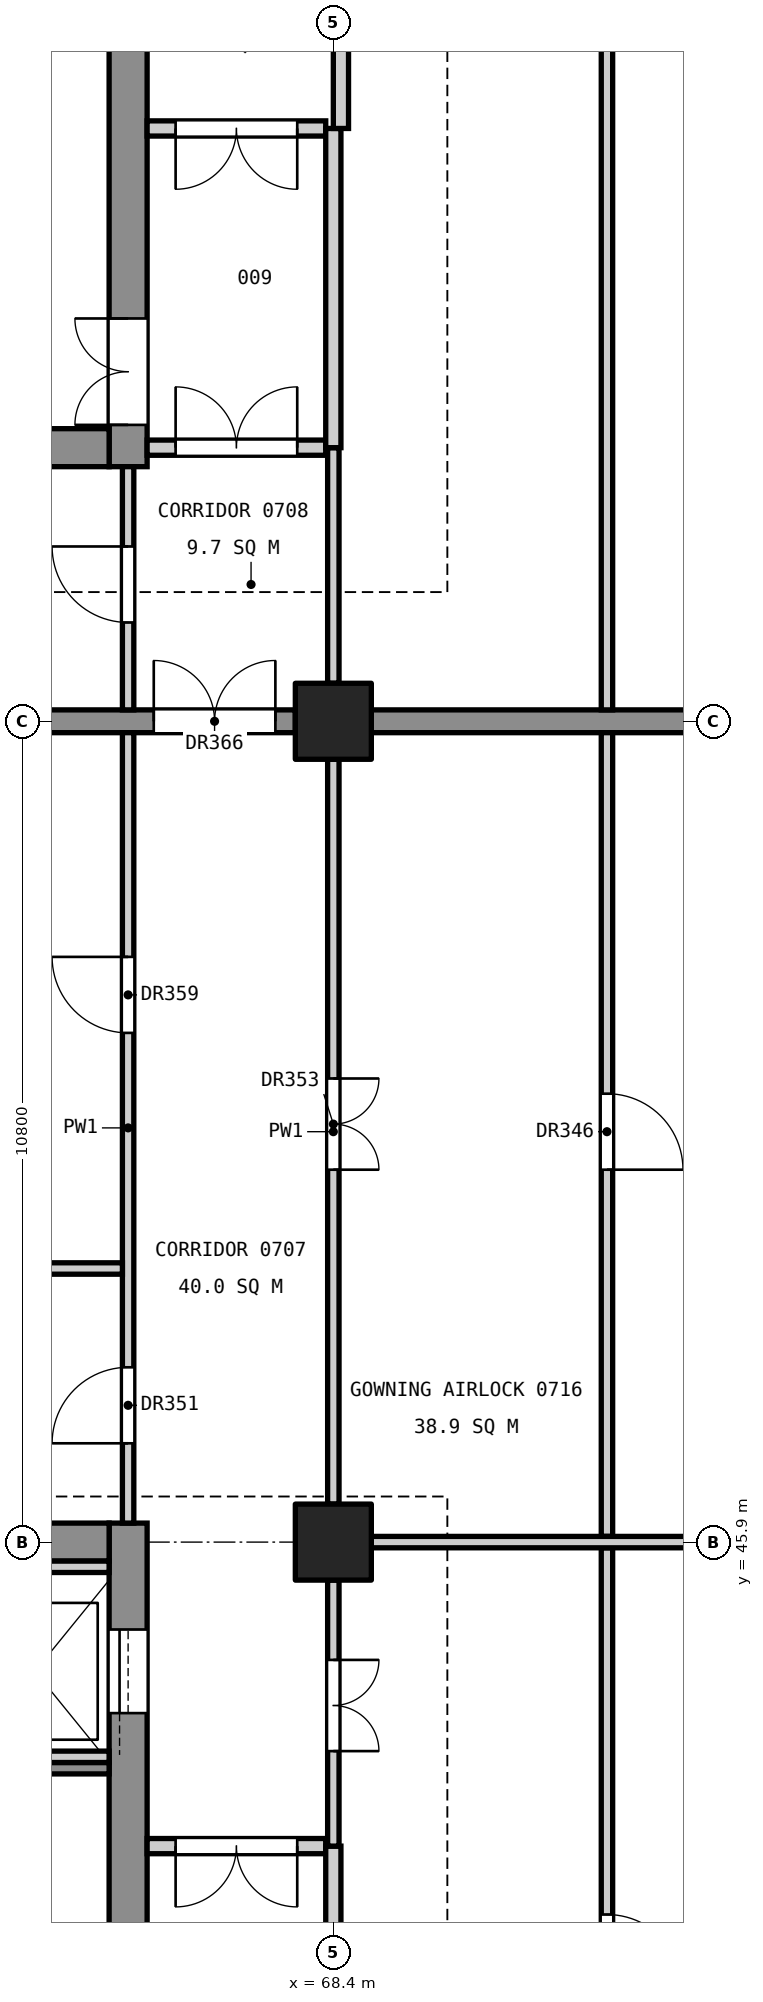
"""IFC4 building model, lengths in metres.
Left out: names, types, materials, properties, quantities, classifications, styles, units other than length and angle.
Written with IfcOpenShell. Run it as: python <this file> out.ifc"""

import sys

from ifc_helpers import new_model, si_unit, direction, frame, frame_2d, origin, origin_2d, place, context, subcontext, project, spatial, rectangle, extrude, element, fill, save


model = new_model("IFC4")
c1 = context("Model", 3, precision=1e-05, world=origin(), true_north=direction((0.0, 1.0)))
c2 = subcontext(c1, "Body", "Model", "MODEL_VIEW")
j1 = project(units=[si_unit("LENGTHUNIT", "METRE"), si_unit("PLANEANGLEUNIT", "RADIAN")], contexts=[c1])
p1 = place(None, origin())
s1 = spatial("IfcSite", under=j1, at=p1, CompositionType="ELEMENT")
p2 = place(p1, origin())
s2 = spatial("IfcBuilding", under=s1, at=p2, CompositionType="ELEMENT")
p3 = place(p2, frame((0.0, 0.0, 36.6)))
s3 = spatial("IfcBuildingStorey", under=s2, at=p3, CompositionType="ELEMENT", Elevation=36.6)
for number, where, z_axis, x_axis in (
    (1, (68.4, 45.9, 0.0), (0.0, 0.0, 1.0), (1.0, 0.0, 0.0)),
    (2, (68.4, 56.7, 0.0), (0.0, 0.0, 1.0), (1.0, 0.0, 0.0)),
):
    element("IfcColumn", number, at=place(p3, frame(where, z_axis=z_axis, x_axis=x_axis)), inside=s3, PredefinedType="COLUMN", context=c2, shape_type="SweptSolid", body=[
        extrude(rectangle(XDim=1.0, YDim=1.0, at=origin_2d()), origin(), (0.0, 0.0, 1.0), 4.8),
    ])
p4 = place(p3, frame((65.7, 34.85, 0.0), z_axis=(0.0, 0.0, 1.0), x_axis=(0.0, 1.0, 0.0)))
e3 = element("IfcWall", 3, at=p4, inside=s3, PredefinedType="SHEAR", context=c2, shape_type="SweptSolid", body=[
    extrude(rectangle(XDim=11.3, YDim=0.5, at=frame_2d((5.65, 0.0))), origin(), (0.0, 0.0, 1.0), 4.55),
])
p5 = place(p4, frame((0.55, 0.0, 0.0)))
e4 = element("IfcOpeningElement", 4, at=p5, cuts=e3, PredefinedType="OPENING", context=c2, shape_type="SweptSolid", body=[
    extrude(rectangle(XDim=1.4, YDim=2.1, at=frame_2d((0.7, 1.05))), frame((0.0, 0.26, 0.0), z_axis=(0.0, -1.0, 0.0), x_axis=(1.0, 0.0, 0.0)), (0.0, 0.0, 1.0), 0.52),
])
p6 = place(p4, frame((8.8, 0.0, 0.0)))
e5 = element("IfcOpeningElement", 5, at=p6, cuts=e3, PredefinedType="OPENING", context=c2, shape_type="SweptSolid", body=[
    extrude(rectangle(XDim=1.1, YDim=2.1, at=frame_2d((0.55, 1.05))), frame((0.0, 0.26, 0.0), z_axis=(0.0, -1.0, 0.0), x_axis=(1.0, 0.0, 0.0)), (0.0, 0.0, 1.0), 0.52),
])
p7 = place(p3, frame((61.45, 45.9, 0.0), z_axis=(0.0, 0.0, 1.0), x_axis=(1.0, 0.0, 0.0)))
e6 = element("IfcWall", 6, at=p7, inside=s3, PredefinedType="SHEAR", context=c2, shape_type="SweptSolid", body=[
    extrude(rectangle(XDim=4.0, YDim=0.5, at=frame_2d((2.0, 0.0))), origin(), (0.0, 0.0, 1.0), 4.55),
])
p8 = place(p3, frame((65.7, 60.05, 0.0), z_axis=(0.0, 0.0, 1.0), x_axis=(0.0, 1.0, 0.0)))
e7 = element("IfcWall", 7, at=p8, inside=s3, PredefinedType="SHEAR", context=c2, shape_type="SweptSolid", body=[
    extrude(rectangle(XDim=14.9, YDim=0.5, at=frame_2d((7.45, 0.0))), origin(), (0.0, 0.0, 1.0), 4.55),
])
p9 = place(p8, frame((0.55, 0.0, 0.0)))
e8 = element("IfcOpeningElement", 8, at=p9, cuts=e7, PredefinedType="OPENING", context=c2, shape_type="SweptSolid", body=[
    extrude(rectangle(XDim=1.4, YDim=2.1, at=frame_2d((0.7, 1.05))), frame((0.0, 0.26, 0.0), z_axis=(0.0, -1.0, 0.0), x_axis=(1.0, 0.0, 0.0)), (0.0, 0.0, 1.0), 0.52),
])
p10 = place(p8, frame((8.85, 0.0, 0.0)))
e9 = element("IfcOpeningElement", 9, at=p10, cuts=e7, PredefinedType="OPENING", context=c2, shape_type="SweptSolid", body=[
    extrude(rectangle(XDim=1.1, YDim=2.1, at=frame_2d((0.55, 1.05))), frame((0.0, 0.26, 0.0), z_axis=(0.0, -1.0, 0.0), x_axis=(1.0, 0.0, 0.0)), (0.0, 0.0, 1.0), 0.52),
])
p11 = place(p8, frame((11.4, 0.0, 0.0)))
e10 = element("IfcOpeningElement", 10, at=p11, cuts=e7, PredefinedType="OPENING", context=c2, shape_type="SweptSolid", body=[
    extrude(rectangle(XDim=1.1, YDim=2.1, at=frame_2d((0.55, 1.05))), frame((0.0, 0.26, 0.0), z_axis=(0.0, -1.0, 0.0), x_axis=(1.0, 0.0, 0.0)), (0.0, 0.0, 1.0), 0.52),
])
p12 = place(p3, frame((61.45, 60.3, 0.0), z_axis=(0.0, 0.0, 1.0), x_axis=(1.0, 0.0, 0.0)))
e11 = element("IfcWall", 11, at=p12, inside=s3, PredefinedType="SHEAR", context=c2, shape_type="SweptSolid", body=[
    extrude(rectangle(XDim=4.0, YDim=0.5, at=frame_2d((2.0, 0.0))), origin(), (0.0, 0.0, 1.0), 4.55),
])
p13 = place(p3, frame((61.7, 56.7, 0.0), z_axis=(0.0, 0.0, 1.0), x_axis=(1.0, 0.0, 0.0)))
e12 = element("IfcWall", 12, at=p13, inside=s3, PredefinedType="SHEAR", context=c2, shape_type="SweptSolid", body=[
    extrude(rectangle(XDim=6.2, YDim=0.3, at=frame_2d((3.1, 0.0))), origin(), (0.0, 0.0, 1.0), 4.55),
])
p14 = place(p13, frame((4.337, 0.0, 0.0)))
e13 = element("IfcOpeningElement", 13, at=p14, cuts=e12, PredefinedType="OPENING", context=c2, shape_type="SweptSolid", body=[
    extrude(rectangle(XDim=1.6, YDim=2.1, at=frame_2d((0.8, 1.05))), frame((0.0, 0.16, 0.0), z_axis=(0.0, -1.0, 0.0), x_axis=(1.0, 0.0, 0.0)), (0.0, 0.0, 1.0), 0.32),
])
p15 = place(p3, frame((68.9, 56.7, 0.0), z_axis=(0.0, 0.0, 1.0), x_axis=(1.0, 0.0, 0.0)))
e14 = element("IfcWall", 14, at=p15, inside=s3, PredefinedType="SHEAR", context=c2, shape_type="SweptSolid", body=[
    extrude(rectangle(XDim=9.8, YDim=0.3, at=frame_2d((4.9, 0.0))), origin(), (0.0, 0.0, 1.0), 4.55),
])
p16 = place(p3, frame((61.45, 42.925, 0.0), z_axis=(0.0, 0.0, 1.0), x_axis=(1.0, 0.0, 0.0)))
e15 = element("IfcWall", 15, at=p16, inside=s3, PredefinedType="SOLIDWALL", context=c2, shape_type="SweptSolid", body=[
    extrude(rectangle(XDim=4.0, YDim=0.15, at=frame_2d((2.0, 0.0))), origin(), (0.0, 0.0, 1.0), 4.55),
])
for number, where, z_axis, x_axis in (
    (16, (63.65, 43.075, 0.0), (0.0, 0.0, 1.0), (1.0, 0.0, 0.0)),
    (17, (63.65, 45.575, 0.0), (0.0, 0.0, 1.0), (1.0, 0.0, 0.0)),
):
    element("IfcWall", number, at=place(p3, frame(where, z_axis=z_axis, x_axis=x_axis)), inside=s3, PredefinedType="SOLIDWALL", context=c2, shape_type="SweptSolid", body=[
        extrude(rectangle(XDim=1.8, YDim=0.15, at=frame_2d((0.9, 0.0))), origin(), (0.0, 0.0, 1.0), 4.8),
    ])
p17 = place(p3, frame((65.7, 46.15, 0.0), z_axis=(0.0, 0.0, 1.0), x_axis=(0.0, 1.0, 0.0)))
e18 = element("IfcWall", 18, at=p17, inside=s3, PredefinedType="PARTITIONING", context=c2, shape_type="SweptSolid", body=[
    extrude(rectangle(XDim=10.4, YDim=0.15, at=frame_2d((5.2, 0.0))), origin(), (0.0, 0.0, 1.0), 3.55),
])
p18 = place(p17, frame((1.05, 0.0, 0.0)))
e19 = element("IfcOpeningElement", 19, at=p18, cuts=e18, PredefinedType="OPENING", context=c2, shape_type="SweptSolid", body=[
    extrude(rectangle(XDim=1.0, YDim=2.1, at=frame_2d((0.5, 1.05))), frame((0.0, 0.085, 0.0), z_axis=(0.0, -1.0, 0.0), x_axis=(1.0, 0.0, 0.0)), (0.0, 0.0, 1.0), 0.17),
])
p19 = place(p17, frame((6.45, 0.0, 0.0)))
e20 = element("IfcOpeningElement", 20, at=p19, cuts=e18, PredefinedType="OPENING", context=c2, shape_type="SweptSolid", body=[
    extrude(rectangle(XDim=1.0, YDim=2.1, at=frame_2d((0.5, 1.05))), frame((0.0, 0.085, 0.0), z_axis=(0.0, -1.0, 0.0), x_axis=(1.0, 0.0, 0.0)), (0.0, 0.0, 1.0), 0.17),
])
p20 = place(p3, frame((65.7, 56.85, 0.0), z_axis=(0.0, 0.0, 1.0), x_axis=(0.0, 1.0, 0.0)))
e21 = element("IfcWall", 21, at=p20, inside=s3, PredefinedType="PARTITIONING", context=c2, shape_type="SweptSolid", body=[
    extrude(rectangle(XDim=3.2, YDim=0.15, at=frame_2d((1.6, 0.0))), origin(), (0.0, 0.0, 1.0), 3.55),
])
p21 = place(p20, frame((1.15, 0.0, 0.0)))
e22 = element("IfcOpeningElement", 22, at=p21, cuts=e21, PredefinedType="OPENING", context=c2, shape_type="SweptSolid", body=[
    extrude(rectangle(XDim=1.0, YDim=2.1, at=frame_2d((0.5, 1.05))), frame((0.0, 0.085, 0.0), z_axis=(0.0, -1.0, 0.0), x_axis=(1.0, 0.0, 0.0)), (0.0, 0.0, 1.0), 0.17),
])
p22 = place(p3, frame((61.35, 49.5, 0.0), z_axis=(0.0, 0.0, 1.0), x_axis=(1.0, 0.0, 0.0)))
e23 = element("IfcWall", 23, at=p22, inside=s3, PredefinedType="PARTITIONING", context=c2, shape_type="SweptSolid", body=[
    extrude(rectangle(XDim=4.275, YDim=0.15, at=frame_2d((2.137, 0.0))), origin(), (0.0, 0.0, 1.0), 3.85),
])
p23 = place(p3, frame((65.95, 41.9, 0.0), z_axis=(0.0, 0.0, 1.0), x_axis=(1.0, 0.0, 0.0)))
e24 = element("IfcWall", 24, at=p23, inside=s3, PredefinedType="PARTITIONING", context=c2, shape_type="SweptSolid", body=[
    extrude(rectangle(XDim=2.35, YDim=0.2, at=frame_2d((1.175, 0.0))), origin(), (0.0, 0.0, 1.0), 3.55),
])
p24 = place(p23, frame((0.375, 0.0, 0.0)))
e25 = element("IfcOpeningElement", 25, at=p24, cuts=e24, PredefinedType="OPENING", context=c2, shape_type="SweptSolid", body=[
    extrude(rectangle(XDim=1.6, YDim=2.1, at=frame_2d((0.8, 1.05))), frame((0.0, 0.11, 0.0), z_axis=(0.0, -1.0, 0.0), x_axis=(1.0, 0.0, 0.0)), (0.0, 0.0, 1.0), 0.22),
])
p25 = place(p3, frame((65.95, 60.3, 0.0), z_axis=(0.0, 0.0, 1.0), x_axis=(1.0, 0.0, 0.0)))
e26 = element("IfcWall", 26, at=p25, inside=s3, PredefinedType="PARTITIONING", context=c2, shape_type="SweptSolid", body=[
    extrude(rectangle(XDim=2.35, YDim=0.2, at=frame_2d((1.175, 0.0))), origin(), (0.0, 0.0, 1.0), 3.85),
])
p26 = place(p25, frame((0.375, 0.0, 0.0)))
e27 = element("IfcOpeningElement", 27, at=p26, cuts=e26, PredefinedType="OPENING", context=c2, shape_type="SweptSolid", body=[
    extrude(rectangle(XDim=1.6, YDim=2.1, at=frame_2d((0.8, 1.05))), frame((0.0, 0.11, 0.0), z_axis=(0.0, -1.0, 0.0), x_axis=(1.0, 0.0, 0.0)), (0.0, 0.0, 1.0), 0.22),
])
p27 = place(p3, frame((65.95, 64.5, 0.0), z_axis=(0.0, 0.0, 1.0), x_axis=(1.0, 0.0, 0.0)))
e28 = element("IfcWall", 28, at=p27, inside=s3, PredefinedType="PARTITIONING", context=c2, shape_type="SweptSolid", body=[
    extrude(rectangle(XDim=2.35, YDim=0.2, at=frame_2d((1.175, 0.0))), origin(), (0.0, 0.0, 1.0), 3.55),
])
p28 = place(p27, frame((0.375, 0.0, 0.0)))
e29 = element("IfcOpeningElement", 29, at=p28, cuts=e28, PredefinedType="OPENING", context=c2, shape_type="SweptSolid", body=[
    extrude(rectangle(XDim=1.6, YDim=2.1, at=frame_2d((0.8, 1.05))), frame((0.0, 0.11, 0.0), z_axis=(0.0, -1.0, 0.0), x_axis=(1.0, 0.0, 0.0)), (0.0, 0.0, 1.0), 0.22),
])
p29 = place(p3, frame((68.4, 35.6, 0.0), z_axis=(0.0, 0.0, 1.0), x_axis=(0.0, 1.0, 0.0)))
e30 = element("IfcWall", 30, at=p29, inside=s3, PredefinedType="PARTITIONING", context=c2, shape_type="SweptSolid", body=[
    extrude(rectangle(XDim=6.3, YDim=0.2, at=frame_2d((3.15, 0.0))), origin(), (0.0, 0.0, 1.0), 3.55),
])
p30 = place(p3, frame((68.4, 41.9, 0.0), z_axis=(0.0, 0.0, 1.0), x_axis=(0.0, 1.0, 0.0)))
e31 = element("IfcWall", 31, at=p30, inside=s3, PredefinedType="PARTITIONING", context=c2, shape_type="SweptSolid", body=[
    extrude(rectangle(XDim=3.5, YDim=0.15, at=frame_2d((1.75, 0.0))), origin(), (0.0, 0.0, 1.0), 3.55),
])
p31 = place(p30, frame((1.25, 0.0, 0.0)))
e32 = element("IfcOpeningElement", 32, at=p31, cuts=e31, PredefinedType="OPENING", context=c2, shape_type="SweptSolid", body=[
    extrude(rectangle(XDim=1.2, YDim=2.1, at=frame_2d((0.6, 1.05))), frame((0.0, 0.085, 0.0), z_axis=(0.0, -1.0, 0.0), x_axis=(1.0, 0.0, 0.0)), (0.0, 0.0, 1.0), 0.17),
])
p32 = place(p3, frame((68.4, 46.4, 0.0), z_axis=(0.0, 0.0, 1.0), x_axis=(0.0, 1.0, 0.0)))
e33 = element("IfcWall", 33, at=p32, inside=s3, PredefinedType="PARTITIONING", context=c2, shape_type="SweptSolid", body=[
    extrude(rectangle(XDim=9.8, YDim=0.15, at=frame_2d((4.9, 0.0))), origin(), (0.0, 0.0, 1.0), 3.55),
])
p33 = place(p32, frame((4.4, 0.0, 0.0)))
e34 = element("IfcOpeningElement", 34, at=p33, cuts=e33, PredefinedType="OPENING", context=c2, shape_type="SweptSolid", body=[
    extrude(rectangle(XDim=1.2, YDim=2.1, at=frame_2d((0.6, 1.05))), frame((0.0, 0.085, 0.0), z_axis=(0.0, -1.0, 0.0), x_axis=(1.0, 0.0, 0.0)), (0.0, 0.0, 1.0), 0.17),
])
p34 = place(p3, frame((68.4, 57.2, 0.0), z_axis=(0.0, 0.0, 1.0), x_axis=(0.0, 1.0, 0.0)))
e35 = element("IfcWall", 35, at=p34, inside=s3, PredefinedType="PARTITIONING", context=c2, shape_type="SweptSolid", body=[
    extrude(rectangle(XDim=3.1, YDim=0.15, at=frame_2d((1.55, 0.0))), origin(), (0.0, 0.0, 1.0), 3.55),
])
p35 = place(p3, frame((68.4, 60.3, 0.0), z_axis=(0.0, 0.0, 1.0), x_axis=(0.0, 1.0, 0.0)))
e36 = element("IfcWall", 36, at=p35, inside=s3, PredefinedType="PARTITIONING", context=c2, shape_type="SweptSolid", body=[
    extrude(rectangle(XDim=4.2, YDim=0.2, at=frame_2d((2.1, 0.0))), origin(), (0.0, 0.0, 1.0), 3.55),
])
p36 = place(p3, frame((68.5, 64.5, 0.0), z_axis=(0.0, 0.0, 1.0), x_axis=(0.0, 1.0, 0.0)))
e37 = element("IfcWall", 37, at=p36, inside=s3, PredefinedType="PARTITIONING", context=c2, shape_type="SweptSolid", body=[
    extrude(rectangle(XDim=2.5, YDim=0.2, at=frame_2d((1.25, 0.0))), origin(), (0.0, 0.0, 1.0), 3.55),
])
p37 = place(p3, frame((72.0, 35.25, 0.0), z_axis=(0.0, 0.0, 1.0), x_axis=(0.0, 1.0, 0.0)))
e38 = element("IfcWall", 38, at=p37, inside=s3, PredefinedType="PARTITIONING", context=c2, shape_type="SweptSolid", body=[
    extrude(rectangle(XDim=10.575, YDim=0.15, at=frame_2d((5.288, 0.0))), origin(), (0.0, 0.0, 1.0), 3.55),
])
p38 = place(p37, frame((4.75, 0.0, 0.0)))
e39 = element("IfcOpeningElement", 39, at=p38, cuts=e38, PredefinedType="OPENING", context=c2, shape_type="SweptSolid", body=[
    extrude(rectangle(XDim=1.0, YDim=2.1, at=frame_2d((0.5, 1.05))), frame((0.0, 0.085, 0.0), z_axis=(0.0, -1.0, 0.0), x_axis=(1.0, 0.0, 0.0)), (0.0, 0.0, 1.0), 0.17),
])
p39 = place(p3, frame((72.0, 45.975, 0.0), z_axis=(0.0, 0.0, 1.0), x_axis=(0.0, 1.0, 0.0)))
e40 = element("IfcWall", 40, at=p39, inside=s3, PredefinedType="PARTITIONING", context=c2, shape_type="SweptSolid", body=[
    extrude(rectangle(XDim=10.575, YDim=0.15, at=frame_2d((5.288, 0.0))), origin(), (0.0, 0.0, 1.0), 3.55),
])
p40 = place(p39, frame((4.825, 0.0, 0.0)))
e41 = element("IfcOpeningElement", 41, at=p40, cuts=e40, PredefinedType="OPENING", context=c2, shape_type="SweptSolid", body=[
    extrude(rectangle(XDim=1.0, YDim=2.1, at=frame_2d((0.5, 1.05))), frame((0.0, 0.085, 0.0), z_axis=(0.0, -1.0, 0.0), x_axis=(1.0, 0.0, 0.0)), (0.0, 0.0, 1.0), 0.17),
])
p41 = place(p3, frame((72.0, 56.85, 0.0), z_axis=(0.0, 0.0, 1.0), x_axis=(0.0, 1.0, 0.0)))
e42 = element("IfcWall", 42, at=p41, inside=s3, PredefinedType="PARTITIONING", context=c2, shape_type="SweptSolid", body=[
    extrude(rectangle(XDim=21.3, YDim=0.15, at=frame_2d((10.65, 0.0))), origin(), (0.0, 0.0, 1.0), 3.55),
])
p42 = place(p41, frame((10.15, 0.0, 0.0)))
e43 = element("IfcOpeningElement", 43, at=p42, cuts=e42, PredefinedType="OPENING", context=c2, shape_type="SweptSolid", body=[
    extrude(rectangle(XDim=1.0, YDim=2.1, at=frame_2d((0.5, 1.05))), frame((0.0, 0.085, 0.0), z_axis=(0.0, -1.0, 0.0), x_axis=(1.0, 0.0, 0.0)), (0.0, 0.0, 1.0), 0.17),
])
p43 = place(p3, frame((68.9, 45.9, 0.0), z_axis=(0.0, 0.0, 1.0), x_axis=(1.0, 0.0, 0.0)))
e44 = element("IfcWall", 44, at=p43, inside=s3, PredefinedType="PARTITIONING", context=c2, shape_type="SweptSolid", body=[
    extrude(rectangle(XDim=9.8, YDim=0.15, at=frame_2d((4.9, 0.0))), origin(), (0.0, 0.0, 1.0), 3.85),
])
p44 = place(p9, origin())
e45 = element("IfcDoor", 45, at=p44, inside=s3, OperationType="DOUBLE_DOOR_SINGLE_SWING", PredefinedType="DOOR", context=c2, shape_type="SweptSolid", body=[
    extrude(rectangle(XDim=1.4, YDim=2.1, at=frame_2d((0.7, 1.05))), frame((0.0, 0.025, 0.0), z_axis=(0.0, -1.0, 0.0), x_axis=(1.0, 0.0, 0.0)), (0.0, 0.0, 1.0), 0.05),
])
fill(e8, e45)
p45 = place(p6, origin())
e46 = element("IfcDoor", 46, at=p45, inside=s3, OperationType="SLIDING_TO_LEFT", PredefinedType="DOOR", context=c2, shape_type="SweptSolid", body=[
    extrude(rectangle(XDim=1.1, YDim=2.1, at=frame_2d((0.55, 1.05))), frame((0.0, 0.025, 0.0), z_axis=(0.0, -1.0, 0.0), x_axis=(1.0, 0.0, 0.0)), (0.0, 0.0, 1.0), 0.05),
])
fill(e5, e46)
p46 = place(p38, frame((1.0, 0.0, 0.0), z_axis=(0.0, 0.0, 1.0), x_axis=(-1.0, 0.0, 0.0)))
e47 = element("IfcDoor", 47, at=p46, inside=s3, OperationType="SINGLE_SWING_RIGHT", PredefinedType="DOOR", context=c2, shape_type="SweptSolid", body=[
    extrude(rectangle(XDim=1.0, YDim=2.1, at=frame_2d((0.5, 1.05))), frame((0.0, 0.025, 0.0), z_axis=(0.0, -1.0, 0.0), x_axis=(1.0, 0.0, 0.0)), (0.0, 0.0, 1.0), 0.05),
])
fill(e39, e47)
p47 = place(p40, frame((1.0, 0.0, 0.0), z_axis=(0.0, 0.0, 1.0), x_axis=(-1.0, 0.0, 0.0)))
e48 = element("IfcDoor", 48, at=p47, inside=s3, OperationType="SINGLE_SWING_RIGHT", PredefinedType="DOOR", context=c2, shape_type="SweptSolid", body=[
    extrude(rectangle(XDim=1.0, YDim=2.1, at=frame_2d((0.5, 1.05))), frame((0.0, 0.025, 0.0), z_axis=(0.0, -1.0, 0.0), x_axis=(1.0, 0.0, 0.0)), (0.0, 0.0, 1.0), 0.05),
])
fill(e41, e48)
p48 = place(p21, origin())
e49 = element("IfcDoor", 49, at=p48, inside=s3, OperationType="SINGLE_SWING_RIGHT", PredefinedType="DOOR", context=c2, shape_type="SweptSolid", body=[
    extrude(rectangle(XDim=1.0, YDim=2.1, at=frame_2d((0.5, 1.05))), frame((0.0, 0.025, 0.0), z_axis=(0.0, -1.0, 0.0), x_axis=(1.0, 0.0, 0.0)), (0.0, 0.0, 1.0), 0.05),
])
fill(e22, e49)
p49 = place(p18, origin())
e50 = element("IfcDoor", 50, at=p49, inside=s3, OperationType="SINGLE_SWING_LEFT", PredefinedType="DOOR", context=c2, shape_type="SweptSolid", body=[
    extrude(rectangle(XDim=1.0, YDim=2.1, at=frame_2d((0.5, 1.05))), frame((0.0, 0.025, 0.0), z_axis=(0.0, -1.0, 0.0), x_axis=(1.0, 0.0, 0.0)), (0.0, 0.0, 1.0), 0.05),
])
fill(e19, e50)
p50 = place(p31, frame((1.2, 0.0, 0.0), z_axis=(0.0, 0.0, 1.0), x_axis=(-1.0, 0.0, 0.0)))
e51 = element("IfcDoor", 51, at=p50, inside=s3, OperationType="DOUBLE_DOOR_SINGLE_SWING", PredefinedType="DOOR", context=c2, shape_type="SweptSolid", body=[
    extrude(rectangle(XDim=1.2, YDim=2.1, at=frame_2d((0.6, 1.05))), frame((0.0, 0.025, 0.0), z_axis=(0.0, -1.0, 0.0), x_axis=(1.0, 0.0, 0.0)), (0.0, 0.0, 1.0), 0.05),
])
fill(e32, e51)
p51 = place(p33, frame((1.2, 0.0, 0.0), z_axis=(0.0, 0.0, 1.0), x_axis=(-1.0, 0.0, 0.0)))
e52 = element("IfcDoor", 52, at=p51, inside=s3, OperationType="DOUBLE_DOOR_SINGLE_SWING", PredefinedType="DOOR", context=c2, shape_type="SweptSolid", body=[
    extrude(rectangle(XDim=1.2, YDim=2.1, at=frame_2d((0.6, 1.05))), frame((0.0, 0.025, 0.0), z_axis=(0.0, -1.0, 0.0), x_axis=(1.0, 0.0, 0.0)), (0.0, 0.0, 1.0), 0.05),
])
fill(e34, e52)
p52 = place(p19, origin())
e53 = element("IfcDoor", 53, at=p52, inside=s3, OperationType="SINGLE_SWING_RIGHT", PredefinedType="DOOR", context=c2, shape_type="SweptSolid", body=[
    extrude(rectangle(XDim=1.0, YDim=2.1, at=frame_2d((0.5, 1.05))), frame((0.0, 0.025, 0.0), z_axis=(0.0, -1.0, 0.0), x_axis=(1.0, 0.0, 0.0)), (0.0, 0.0, 1.0), 0.05),
])
fill(e20, e53)
p53 = place(p24, frame((1.6, 0.0, 0.0), z_axis=(0.0, 0.0, 1.0), x_axis=(-1.0, 0.0, 0.0)))
e54 = element("IfcDoor", 54, at=p53, inside=s3, OperationType="DOUBLE_DOOR_SINGLE_SWING", PredefinedType="DOOR", context=c2, shape_type="SweptSolid", body=[
    extrude(rectangle(XDim=1.6, YDim=2.1, at=frame_2d((0.8, 1.05))), frame((0.0, 0.025, 0.0), z_axis=(0.0, -1.0, 0.0), x_axis=(1.0, 0.0, 0.0)), (0.0, 0.0, 1.0), 0.05),
])
fill(e25, e54)
p54 = place(p26, origin())
e55 = element("IfcDoor", 55, at=p54, inside=s3, OperationType="DOUBLE_DOOR_SINGLE_SWING", PredefinedType="DOOR", context=c2, shape_type="SweptSolid", body=[
    extrude(rectangle(XDim=1.6, YDim=2.1, at=frame_2d((0.8, 1.05))), frame((0.0, 0.025, 0.0), z_axis=(0.0, -1.0, 0.0), x_axis=(1.0, 0.0, 0.0)), (0.0, 0.0, 1.0), 0.05),
])
fill(e27, e55)
p55 = place(p28, frame((1.6, 0.0, 0.0), z_axis=(0.0, 0.0, 1.0), x_axis=(-1.0, 0.0, 0.0)))
e56 = element("IfcDoor", 56, at=p55, inside=s3, OperationType="DOUBLE_DOOR_SINGLE_SWING", PredefinedType="DOOR", context=c2, shape_type="SweptSolid", body=[
    extrude(rectangle(XDim=1.6, YDim=2.1, at=frame_2d((0.8, 1.05))), frame((0.0, 0.025, 0.0), z_axis=(0.0, -1.0, 0.0), x_axis=(1.0, 0.0, 0.0)), (0.0, 0.0, 1.0), 0.05),
])
fill(e29, e56)
p56 = place(p14, origin())
e57 = element("IfcDoor", 57, at=p56, inside=s3, OperationType="DOUBLE_DOOR_SINGLE_SWING", PredefinedType="DOOR", context=c2, shape_type="SweptSolid", body=[
    extrude(rectangle(XDim=1.6, YDim=2.1, at=frame_2d((0.8, 1.05))), frame((0.0, 0.025, 0.0), z_axis=(0.0, -1.0, 0.0), x_axis=(1.0, 0.0, 0.0)), (0.0, 0.0, 1.0), 0.05),
])
fill(e13, e57)
save(model, sys.argv[1])
